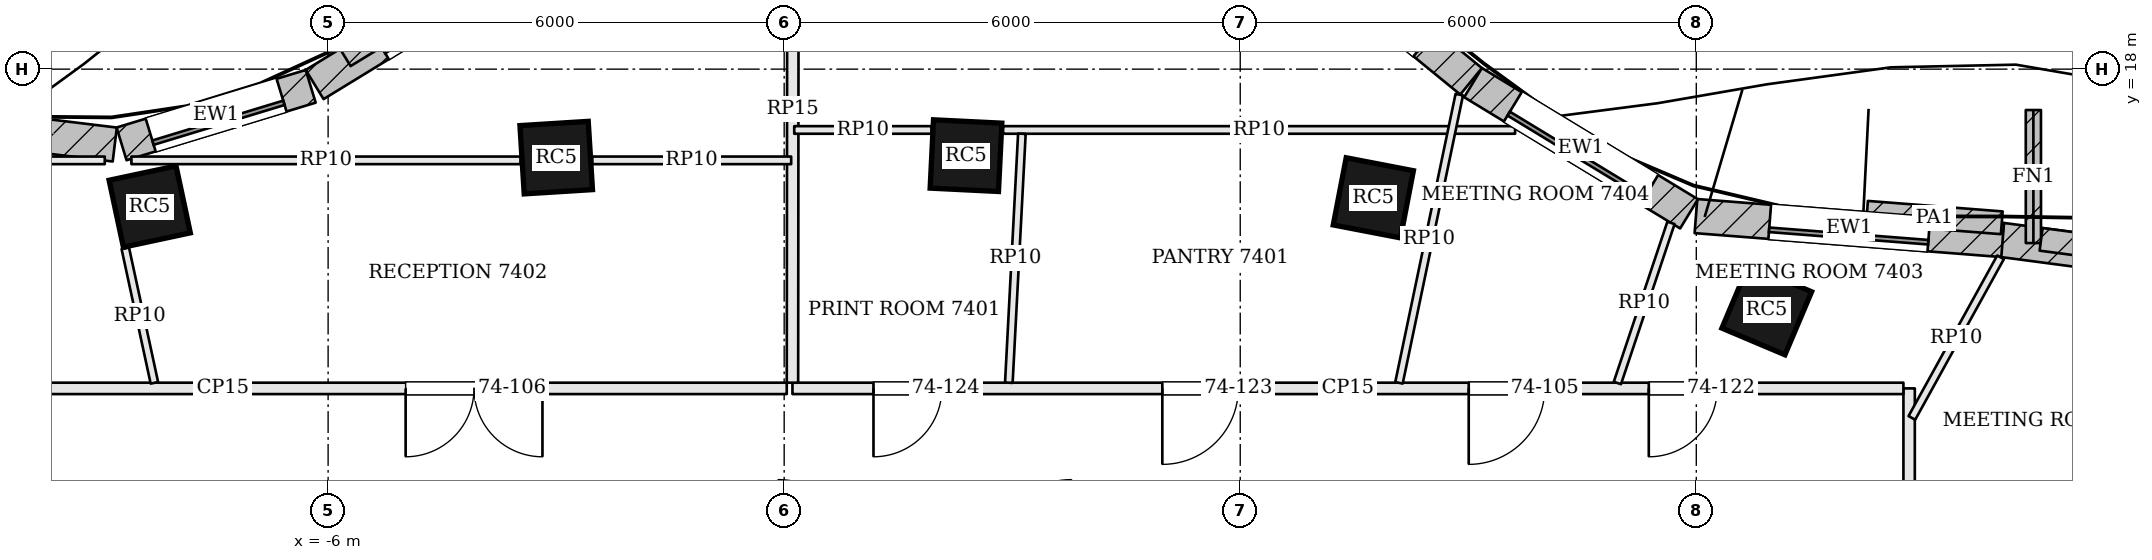
"""IFC4 building model, lengths in metres.
Left out: names, types, materials, properties, quantities, classifications, styles, units other than length and angle.
Written with IfcOpenShell. Run it as: python <this file> out.ifc"""

import sys

from ifc_helpers import new_model, si_unit, direction, frame, frame_2d, origin, origin_2d, place, context, subcontext, project, spatial, rectangle, extrude, element, fill, save


model = new_model("IFC4")
c1 = context("Model", 3, precision=1e-05, world=origin(), true_north=direction((0.0, 1.0)))
c2 = subcontext(c1, "Body", "Model", "MODEL_VIEW")
j1 = project(units=[si_unit("LENGTHUNIT", "METRE"), si_unit("PLANEANGLEUNIT", "RADIAN")], contexts=[c1])
p1 = place(None, origin())
s1 = spatial("IfcSite", under=j1, at=p1, CompositionType="ELEMENT")
p2 = place(p1, origin())
s2 = spatial("IfcBuilding", under=s1, at=p2, CompositionType="ELEMENT")
p3 = place(p2, frame((0.0, 0.0, 300.0)))
s3 = spatial("IfcBuildingStorey", under=s2, at=p3, CompositionType="ELEMENT", Elevation=300.0)
for number, where, z_axis, x_axis in (
    (1, (12.927, 14.832, 0.0), (0.0, 0.0, 1.0), (-0.921, 0.389, 0.0)),
    (2, (7.751, 16.307, 0.0), (0.0, 0.0, 1.0), (-0.982, 0.189, 0.0)),
    (3, (2.392, 16.862, 0.0), (0.0, 0.0, 1.0), (-0.999, 0.049, 0.0)),
    (4, (-2.999, 16.836, 0.0), (0.0, 0.0, 1.0), (-0.998, -0.062, 0.0)),
    (5, (-8.347, 16.192, 0.0), (0.0, 0.0, 1.0), (-0.978, -0.209, 0.0)),
):
    element("IfcColumn", number, at=place(p3, frame(where, z_axis=z_axis, x_axis=x_axis)), inside=s3, PredefinedType="COLUMN", context=c2, shape_type="SweptSolid", body=[
        extrude(rectangle(XDim=0.9, YDim=0.9, at=origin_2d()), origin(), (0.0, 0.0, 1.0), 3.9),
    ])
p4 = place(p3, frame((21.044, 15.091, 0.0), z_axis=(0.0, 0.0, 1.0), x_axis=(-0.991409967396, 0.130790965086, 0.0)))
e6 = element("IfcWall", 6, at=p4, inside=s3, PredefinedType="SOLIDWALL", context=c2, shape_type="SweptSolid", body=[
    extrude(rectangle(XDim=5.068, YDim=0.45, at=frame_2d((2.534, 0.0))), origin(), (0.0, 0.0, 1.0), 3.7),
])
p5 = place(p4, frame((1.484, 0.0, 0.9)))
e7 = element("IfcOpeningElement", 7, at=p5, cuts=e6, PredefinedType="OPENING", context=c2, shape_type="SweptSolid", body=[
    extrude(rectangle(XDim=2.1, YDim=2.3, at=frame_2d((1.05, 1.15))), frame((0.0, 0.235, 0.0), z_axis=(0.0, -1.0, 0.0), x_axis=(1.0, 0.0, 0.0)), (0.0, 0.0, 1.0), 0.47),
])
p6 = place(p3, frame((16.03, 15.752, 0.0), z_axis=(0.0, 0.0, 1.0), x_axis=(-0.996967628157, 0.077817404267, 0.0)))
e8 = element("IfcWall", 8, at=p6, inside=s3, PredefinedType="SOLIDWALL", context=c2, shape_type="SweptSolid", body=[
    extrude(rectangle(XDim=4.047, YDim=0.45, at=frame_2d((2.023, 0.0))), origin(), (0.0, 0.0, 1.0), 3.7),
])
p7 = place(p6, frame((0.974, 0.0, 0.9)))
e9 = element("IfcOpeningElement", 9, at=p7, cuts=e8, PredefinedType="OPENING", context=c2, shape_type="SweptSolid", body=[
    extrude(rectangle(XDim=2.1, YDim=2.3, at=frame_2d((1.05, 1.15))), frame((0.0, 0.235, 0.0), z_axis=(0.0, -1.0, 0.0), x_axis=(1.0, 0.0, 0.0)), (0.0, 0.0, 1.0), 0.47),
])
p8 = place(p3, frame((11.905, 16.096, 0.0), z_axis=(0.0, 0.0, 1.0), x_axis=(-0.854609476155, 0.519271261738, 0.0)))
e10 = element("IfcWall", 10, at=p8, inside=s3, PredefinedType="SOLIDWALL", context=c2, shape_type="SweptSolid", body=[
    extrude(rectangle(XDim=3.325, YDim=0.45, at=frame_2d((1.663, 0.0))), origin(), (0.0, 0.0, 1.0), 3.7),
])
p9 = place(p8, frame((0.612, 0.0, 0.9)))
e11 = element("IfcOpeningElement", 11, at=p9, cuts=e10, PredefinedType="OPENING", context=c2, shape_type="SweptSolid", body=[
    extrude(rectangle(XDim=2.1, YDim=2.3, at=frame_2d((1.05, 1.15))), frame((0.0, 0.235, 0.0), z_axis=(0.0, -1.0, 0.0), x_axis=(1.0, 0.0, 0.0)), (0.0, 0.0, 1.0), 0.47),
])
p10 = place(p3, frame((9.037, 17.84, 0.0), z_axis=(0.0, 0.0, 1.0), x_axis=(-0.774810240287, 0.632193871804, 0.0)))
e12 = element("IfcWall", 12, at=p10, inside=s3, PredefinedType="SOLIDWALL", context=c2, shape_type="SweptSolid", body=[
    extrude(rectangle(XDim=3.389, YDim=0.45, at=frame_2d((1.695, 0.0))), origin(), (0.0, 0.0, 1.0), 3.7),
])
p11 = place(p10, frame((0.795, 0.0, 0.9)))
e13 = element("IfcOpeningElement", 13, at=p11, cuts=e12, PredefinedType="OPENING", context=c2, shape_type="SweptSolid", body=[
    extrude(rectangle(XDim=1.8, YDim=2.3, at=frame_2d((0.9, 1.15))), frame((0.0, 0.235, 0.0), z_axis=(0.0, -1.0, 0.0), x_axis=(1.0, 0.0, 0.0)), (0.0, 0.0, 1.0), 0.47),
])
p12 = place(p3, frame((-2.669, 19.945, 0.0), z_axis=(0.0, 0.0, 1.0), x_axis=(-0.852919259017, -0.522042850346, 0.0)))
e14 = element("IfcWall", 14, at=p12, inside=s3, PredefinedType="SOLIDWALL", context=c2, shape_type="SweptSolid", body=[
    extrude(rectangle(XDim=4.114, YDim=0.45, at=frame_2d((2.057, 0.0))), origin(), (0.0, 0.0, 1.0), 3.7),
])
p13 = place(p12, frame((1.007, 0.0, 0.9)))
e15 = element("IfcOpeningElement", 15, at=p13, cuts=e14, PredefinedType="OPENING", context=c2, shape_type="SweptSolid", body=[
    extrude(rectangle(XDim=2.1, YDim=2.3, at=frame_2d((1.05, 1.15))), frame((0.0, 0.235, 0.0), z_axis=(0.0, -1.0, 0.0), x_axis=(1.0, 0.0, 0.0)), (0.0, 0.0, 1.0), 0.47),
])
p14 = place(p3, frame((-6.229, 17.774, 0.0), z_axis=(0.0, 0.0, 1.0), x_axis=(-0.95663749396, -0.291281144515, 0.0)))
e16 = element("IfcWall", 16, at=p14, inside=s3, PredefinedType="SOLIDWALL", context=c2, shape_type="SweptSolid", body=[
    extrude(rectangle(XDim=2.601, YDim=0.45, at=frame_2d((1.3, 0.0))), origin(), (0.0, 0.0, 1.0), 3.7),
])
p15 = place(p14, frame((0.4, 0.0, 0.9)))
e17 = element("IfcOpeningElement", 17, at=p15, cuts=e16, PredefinedType="OPENING", context=c2, shape_type="SweptSolid", body=[
    extrude(rectangle(XDim=1.8, YDim=2.3, at=frame_2d((0.9, 1.15))), frame((0.0, 0.235, 0.0), z_axis=(0.0, -1.0, 0.0), x_axis=(1.0, 0.0, 0.0)), (0.0, 0.0, 1.0), 0.47),
])
p16 = place(p3, frame((-8.807, 17.008, 0.0), z_axis=(0.0, 0.0, 1.0), x_axis=(-0.992654419289, 0.120984312483, 0.0)))
e18 = element("IfcWall", 18, at=p16, inside=s3, PredefinedType="SOLIDWALL", context=c2, shape_type="SweptSolid", body=[
    extrude(rectangle(XDim=4.187, YDim=0.45, at=frame_2d((2.094, 0.0))), origin(), (0.0, 0.0, 1.0), 3.7),
])
p17 = place(p16, frame((1.044, 0.0, 0.9)))
e19 = element("IfcOpeningElement", 19, at=p17, cuts=e18, PredefinedType="OPENING", context=c2, shape_type="SweptSolid", body=[
    extrude(rectangle(XDim=2.1, YDim=2.3, at=frame_2d((1.05, 1.15))), frame((0.0, 0.235, 0.0), z_axis=(0.0, -1.0, 0.0), x_axis=(1.0, 0.0, 0.0)), (0.0, 0.0, 1.0), 0.47),
])
p18 = place(p3, frame((16.435, 15.712, 0.0), z_axis=(0.0, 0.0, 1.0), x_axis=(-0.000279017846, 0.999999961075, 0.0)))
e20 = element("IfcWall", 20, at=p18, inside=s3, PredefinedType="SOLIDWALL", context=c2, shape_type="SweptSolid", body=[
    extrude(rectangle(XDim=1.75, YDim=0.2, at=frame_2d((0.875, 0.0))), origin(), (0.0, 0.0, 1.0), 3.7),
])
p19 = place(p3, frame((20.923, 15.182, 3.9), z_axis=(0.0, 0.0, 1.0), x_axis=(-0.991411041714, 0.130782821377, 0.0)))
e21 = element("IfcWall", 21, at=p19, inside=s3, PredefinedType="PARAPET", context=c2, shape_type="SweptSolid", body=[
    extrude(rectangle(XDim=4.424, YDim=0.3, at=frame_2d((2.212, 0.0))), origin(), (0.0, 0.0, 1.0), 1.1),
])
p20 = place(p3, frame((16.019, 15.979, 3.9), z_axis=(0.0, 0.0, 1.0), x_axis=(-0.99696580474, 0.077840761676, 0.0)))
e22 = element("IfcWall", 22, at=p20, inside=s3, PredefinedType="PARAPET", context=c2, shape_type="SweptSolid", body=[
    extrude(rectangle(XDim=1.778, YDim=0.3, at=frame_2d((0.889, 0.0))), origin(), (0.0, 0.0, 1.0), 1.1),
])
p21 = place(p3, frame((-3.118, 19.799, 3.9), z_axis=(0.0, 0.0, 1.0), x_axis=(-0.852922319554, -0.522037849975, 0.0)))
e23 = element("IfcWall", 23, at=p21, inside=s3, PredefinedType="PARAPET", context=c2, shape_type="SweptSolid", body=[
    extrude(rectangle(XDim=3.124, YDim=0.3, at=frame_2d((1.562, 0.0))), origin(), (0.0, 0.0, 1.0), 1.1),
])
p22 = place(p3, frame((14.8, -0.069, 0.0), z_axis=(0.0, 0.0, 1.0), x_axis=(0.0, 1.0, 0.0)))
e24 = element("IfcWall", 24, at=p22, inside=s3, PredefinedType="PARTITIONING", context=c2, shape_type="SweptSolid", body=[
    extrude(rectangle(XDim=13.869, YDim=0.15, at=frame_2d((6.935, 0.0))), origin(), (0.0, 0.0, 1.0), 3.198),
])
p23 = place(p22, frame((1.896, 0.0, 0.0)))
e25 = element("IfcOpeningElement", 25, at=p23, cuts=e24, PredefinedType="OPENING", context=c2, shape_type="SweptSolid", body=[
    extrude(rectangle(XDim=1.8, YDim=2.1, at=frame_2d((0.9, 1.05))), frame((0.0, 0.085, 0.0), z_axis=(0.0, -1.0, 0.0), x_axis=(1.0, 0.0, 0.0)), (0.0, 0.0, 1.0), 0.17),
])
p24 = place(p22, frame((6.355, 0.0, 0.0)))
e26 = element("IfcOpeningElement", 26, at=p24, cuts=e24, PredefinedType="OPENING", context=c2, shape_type="SweptSolid", body=[
    extrude(rectangle(XDim=1.0, YDim=2.4, at=frame_2d((0.5, 1.2))), frame((0.0, 0.085, 0.0), z_axis=(0.0, -1.0, 0.0), x_axis=(1.0, 0.0, 0.0)), (0.0, 0.0, 1.0), 0.17),
])
p25 = place(p22, frame((10.267, 0.0, 0.0)))
e27 = element("IfcOpeningElement", 27, at=p25, cuts=e24, PredefinedType="OPENING", context=c2, shape_type="SweptSolid", body=[
    extrude(rectangle(XDim=1.0, YDim=2.4, at=frame_2d((0.5, 1.2))), frame((0.0, 0.085, 0.0), z_axis=(0.0, -1.0, 0.0), x_axis=(1.0, 0.0, 0.0)), (0.0, 0.0, 1.0), 0.17),
])
p26 = place(p3, frame((14.725, 13.8, 0.0), z_axis=(0.0, 0.0, 1.0), x_axis=(-1.0, 0.0, 0.0)))
e28 = element("IfcWall", 28, at=p26, inside=s3, PredefinedType="PARTITIONING", context=c2, shape_type="SweptSolid", body=[
    extrude(rectangle(XDim=14.616, YDim=0.15, at=frame_2d((7.308, 0.0))), origin(), (0.0, 0.0, 1.0), 3.198),
])
p27 = place(p26, frame((4.719, 0.0, 0.0)))
e29 = element("IfcOpeningElement", 29, at=p27, cuts=e28, PredefinedType="OPENING", context=c2, shape_type="SweptSolid", body=[
    extrude(rectangle(XDim=1.0, YDim=2.4, at=frame_2d((0.5, 1.2))), frame((0.0, 0.085, 0.0), z_axis=(0.0, -1.0, 0.0), x_axis=(1.0, 0.0, 0.0)), (0.0, 0.0, 1.0), 0.17),
])
p28 = place(p26, frame((2.45, 0.0, 0.0)))
e30 = element("IfcOpeningElement", 30, at=p28, cuts=e28, PredefinedType="OPENING", context=c2, shape_type="SweptSolid", body=[
    extrude(rectangle(XDim=0.9, YDim=2.1, at=frame_2d((0.45, 1.05))), frame((0.0, 0.085, 0.0), z_axis=(0.0, -1.0, 0.0), x_axis=(1.0, 0.0, 0.0)), (0.0, 0.0, 1.0), 0.17),
])
p29 = place(p26, frame((8.75, 0.0, 0.0)))
e31 = element("IfcOpeningElement", 31, at=p29, cuts=e28, PredefinedType="OPENING", context=c2, shape_type="SweptSolid", body=[
    extrude(rectangle(XDim=1.0, YDim=2.1, at=frame_2d((0.5, 1.05))), frame((0.0, 0.085, 0.0), z_axis=(0.0, -1.0, 0.0), x_axis=(1.0, 0.0, 0.0)), (0.0, 0.0, 1.0), 0.17),
])
p30 = place(p26, frame((12.65, 0.0, 0.0)))
e32 = element("IfcOpeningElement", 32, at=p30, cuts=e28, PredefinedType="OPENING", context=c2, shape_type="SweptSolid", body=[
    extrude(rectangle(XDim=0.9, YDim=2.1, at=frame_2d((0.45, 1.05))), frame((0.0, 0.085, 0.0), z_axis=(0.0, -1.0, 0.0), x_axis=(1.0, 0.0, 0.0)), (0.0, 0.0, 1.0), 0.17),
])
p31 = place(p3, frame((0.117, 21.087, 0.0), z_axis=(0.0, 0.0, 1.0), x_axis=(-0.001083202939, -0.999999413336, 0.0)))
e33 = element("IfcWall", 33, at=p31, inside=s3, PredefinedType="PARTITIONING", context=c2, shape_type="SweptSolid", body=[
    extrude(rectangle(XDim=7.212, YDim=0.15, at=frame_2d((3.606, 0.0))), origin(), (0.0, 0.0, 1.0), 3.234),
])
p32 = place(p3, frame((0.034, 13.8, 0.0), z_axis=(0.0, 0.0, 1.0), x_axis=(-1.0, 0.0, 0.0)))
e34 = element("IfcWall", 34, at=p32, inside=s3, PredefinedType="PARTITIONING", context=c2, shape_type="SweptSolid", body=[
    extrude(rectangle(XDim=14.834, YDim=0.15, at=frame_2d((7.417, 0.0))), origin(), (0.0, 0.0, 1.0), 3.198),
])
p33 = place(p32, frame((3.214, 0.0, 0.0)))
e35 = element("IfcOpeningElement", 35, at=p33, cuts=e34, PredefinedType="OPENING", context=c2, shape_type="SweptSolid", body=[
    extrude(rectangle(XDim=1.8, YDim=2.1, at=frame_2d((0.9, 1.05))), frame((0.0, 0.085, 0.0), z_axis=(0.0, -1.0, 0.0), x_axis=(1.0, 0.0, 0.0)), (0.0, 0.0, 1.0), 0.17),
])
p34 = place(p32, frame((11.55, 0.0, 0.0)))
e36 = element("IfcOpeningElement", 36, at=p34, cuts=e34, PredefinedType="OPENING", context=c2, shape_type="SweptSolid", body=[
    extrude(rectangle(XDim=1.0, YDim=2.4, at=frame_2d((0.5, 1.2))), frame((0.0, 0.085, 0.0), z_axis=(0.0, -1.0, 0.0), x_axis=(1.0, 0.0, 0.0)), (0.0, 0.0, 1.0), 0.17),
])
p35 = place(p3, frame((0.133, 17.2, 0.0), z_axis=(0.0, 0.0, 1.0), x_axis=(1.0, 0.0, 0.0)))
e37 = element("IfcWall", 37, at=p35, inside=s3, PredefinedType="PARTITIONING", context=c2, shape_type="SweptSolid", body=[
    extrude(rectangle(XDim=1.805, YDim=0.1, at=frame_2d((0.903, 0.0))), origin(), (0.0, 0.0, 1.0), 3.184),
])
p36 = place(p3, frame((2.879, 17.2, 0.0), z_axis=(0.0, 0.0, 1.0), x_axis=(1.0, 0.0, 0.0)))
e38 = element("IfcWall", 38, at=p36, inside=s3, PredefinedType="PARTITIONING", context=c2, shape_type="SweptSolid", body=[
    extrude(rectangle(XDim=6.737, YDim=0.1, at=frame_2d((3.369, 0.0))), origin(), (0.0, 0.0, 1.0), 3.184),
])
p37 = place(p3, frame((14.836, 13.412, 0.0), z_axis=(0.0, 0.0, 1.0), x_axis=(0.483304666726, 0.875452225493, 0.0)))
e39 = element("IfcWall", 39, at=p37, inside=s3, PredefinedType="PARTITIONING", context=c2, shape_type="SweptSolid", body=[
    extrude(rectangle(XDim=2.413, YDim=0.1, at=frame_2d((1.207, 0.0))), origin(), (0.0, 0.0, 1.0), 3.184),
])
p38 = place(p3, frame((10.962, 13.871, 0.0), z_axis=(0.0, 0.0, 1.0), x_axis=(0.317447611302, 0.948275811185, 0.0)))
e40 = element("IfcWall", 40, at=p38, inside=s3, PredefinedType="PARTITIONING", context=c2, shape_type="SweptSolid", body=[
    extrude(rectangle(XDim=2.221, YDim=0.1, at=frame_2d((1.111, 0.0))), origin(), (0.0, 0.0, 1.0), 3.184),
])
p39 = place(p3, frame((8.089, 13.873, 0.0), z_axis=(0.0, 0.0, 1.0), x_axis=(0.204762054833, 0.978811780119, 0.0)))
e41 = element("IfcWall", 41, at=p39, inside=s3, PredefinedType="PARTITIONING", context=c2, shape_type="SweptSolid", body=[
    extrude(rectangle(XDim=3.874, YDim=0.1, at=frame_2d((1.937, 0.0))), origin(), (0.0, 0.0, 1.0), 3.184),
])
p40 = place(p3, frame((2.956, 13.875, 0.0), z_axis=(0.0, 0.0, 1.0), x_axis=(0.052332217716, 0.998629730675, 0.0)))
e42 = element("IfcWall", 42, at=p40, inside=s3, PredefinedType="PARTITIONING", context=c2, shape_type="SweptSolid", body=[
    extrude(rectangle(XDim=3.28, YDim=0.1, at=frame_2d((1.64, 0.0))), origin(), (0.0, 0.0, 1.0), 3.184),
])
p41 = place(p3, frame((-18.319, 16.8, 0.0), z_axis=(0.0, 0.0, 1.0), x_axis=(1.0, 0.0, 0.0)))
e43 = element("IfcWall", 43, at=p41, inside=s3, PredefinedType="PARTITIONING", context=c2, shape_type="SweptSolid", body=[
    extrude(rectangle(XDim=9.381, YDim=0.1, at=frame_2d((4.69, 0.0))), origin(), (0.0, 0.0, 1.0), 3.184),
])
p42 = place(p41, frame((4.25, 0.0, 0.0)))
e44 = element("IfcOpeningElement", 44, at=p42, cuts=e43, PredefinedType="OPENING", context=c2, shape_type="SweptSolid", body=[
    extrude(rectangle(XDim=1.0, YDim=2.4, at=frame_2d((0.5, 1.2))), frame((0.0, 0.06, 0.0), z_axis=(0.0, -1.0, 0.0), x_axis=(1.0, 0.0, 0.0)), (0.0, 0.0, 1.0), 0.12),
])
p43 = place(p3, frame((-8.588, 16.8, 0.0), z_axis=(0.0, 0.0, 1.0), x_axis=(1.0, 0.0, 0.0)))
e45 = element("IfcWall", 45, at=p43, inside=s3, PredefinedType="PARTITIONING", context=c2, shape_type="SweptSolid", body=[
    extrude(rectangle(XDim=5.12, YDim=0.1, at=frame_2d((2.56, 0.0))), origin(), (0.0, 0.0, 1.0), 3.184),
])
p44 = place(p3, frame((-2.526, 16.8, 0.0), z_axis=(0.0, 0.0, 1.0), x_axis=(1.0, 0.0, 0.0)))
e46 = element("IfcWall", 46, at=p44, inside=s3, PredefinedType="PARTITIONING", context=c2, shape_type="SweptSolid", body=[
    extrude(rectangle(XDim=2.618, YDim=0.1, at=frame_2d((1.309, 0.0))), origin(), (0.0, 0.0, 1.0), 3.184),
])
p45 = place(p3, frame((-8.286, 13.873, 0.0), z_axis=(0.0, 0.0, 1.0), x_axis=(-0.21131538294, 0.977417929513, 0.0)))
e47 = element("IfcWall", 47, at=p45, inside=s3, PredefinedType="PARTITIONING", context=c2, shape_type="SweptSolid", body=[
    extrude(rectangle(XDim=1.81, YDim=0.1, at=frame_2d((0.905, 0.0))), origin(), (0.0, 0.0, 1.0), 3.184),
])
p46 = place(p7, origin())
e48 = element("IfcWindow", 48, at=p46, inside=s3, PartitioningType="SINGLE_PANEL", PredefinedType="WINDOW", context=c2, shape_type="SweptSolid", body=[
    extrude(rectangle(XDim=2.1, YDim=2.3, at=frame_2d((1.05, 1.15))), frame((0.0, 0.135, 0.0), z_axis=(0.0, -1.0, 0.0), x_axis=(1.0, 0.0, 0.0)), (0.0, 0.0, 1.0), 0.06),
])
fill(e9, e48)
p47 = place(p9, origin())
e49 = element("IfcWindow", 49, at=p47, inside=s3, PartitioningType="SINGLE_PANEL", PredefinedType="WINDOW", context=c2, shape_type="SweptSolid", body=[
    extrude(rectangle(XDim=2.1, YDim=2.3, at=frame_2d((1.05, 1.15))), frame((0.0, 0.135, 0.0), z_axis=(0.0, -1.0, 0.0), x_axis=(1.0, 0.0, 0.0)), (0.0, 0.0, 1.0), 0.06),
])
fill(e11, e49)
p48 = place(p13, origin())
e50 = element("IfcWindow", 50, at=p48, inside=s3, PartitioningType="SINGLE_PANEL", PredefinedType="WINDOW", context=c2, shape_type="SweptSolid", body=[
    extrude(rectangle(XDim=2.1, YDim=2.3, at=frame_2d((1.05, 1.15))), frame((0.0, 0.135, 0.0), z_axis=(0.0, -1.0, 0.0), x_axis=(1.0, 0.0, 0.0)), (0.0, 0.0, 1.0), 0.06),
])
fill(e15, e50)
p49 = place(p15, origin())
e51 = element("IfcWindow", 51, at=p49, inside=s3, PartitioningType="SINGLE_PANEL", PredefinedType="WINDOW", context=c2, shape_type="SweptSolid", body=[
    extrude(rectangle(XDim=1.8, YDim=2.3, at=frame_2d((0.9, 1.15))), frame((0.0, 0.135, 0.0), z_axis=(0.0, -1.0, 0.0), x_axis=(1.0, 0.0, 0.0)), (0.0, 0.0, 1.0), 0.06),
])
fill(e17, e51)
p50 = place(p27, origin())
e52 = element("IfcDoor", 52, at=p50, inside=s3, OperationType="SINGLE_SWING_RIGHT", PredefinedType="DOOR", context=c2, shape_type="SweptSolid", body=[
    extrude(rectangle(XDim=1.0, YDim=2.4, at=frame_2d((0.5, 1.2))), frame((0.0, 0.025, 0.0), z_axis=(0.0, -1.0, 0.0), x_axis=(1.0, 0.0, 0.0)), (0.0, 0.0, 1.0), 0.05),
])
fill(e29, e52)
p51 = place(p33, origin())
e53 = element("IfcDoor", 53, at=p51, inside=s3, OperationType="DOUBLE_DOOR_SINGLE_SWING", PredefinedType="DOOR", context=c2, shape_type="SweptSolid", body=[
    extrude(rectangle(XDim=1.8, YDim=2.1, at=frame_2d((0.9, 1.05))), frame((0.0, 0.025, 0.0), z_axis=(0.0, -1.0, 0.0), x_axis=(1.0, 0.0, 0.0)), (0.0, 0.0, 1.0), 0.05),
])
fill(e35, e53)
p52 = place(p28, origin())
e54 = element("IfcDoor", 54, at=p52, inside=s3, OperationType="SINGLE_SWING_RIGHT", PredefinedType="DOOR", context=c2, shape_type="SweptSolid", body=[
    extrude(rectangle(XDim=0.9, YDim=2.1, at=frame_2d((0.45, 1.05))), frame((0.0, 0.025, 0.0), z_axis=(0.0, -1.0, 0.0), x_axis=(1.0, 0.0, 0.0)), (0.0, 0.0, 1.0), 0.05),
])
fill(e30, e54)
p53 = place(p29, origin())
e55 = element("IfcDoor", 55, at=p53, inside=s3, OperationType="SINGLE_SWING_RIGHT", PredefinedType="DOOR", context=c2, shape_type="SweptSolid", body=[
    extrude(rectangle(XDim=1.0, YDim=2.1, at=frame_2d((0.5, 1.05))), frame((0.0, 0.025, 0.0), z_axis=(0.0, -1.0, 0.0), x_axis=(1.0, 0.0, 0.0)), (0.0, 0.0, 1.0), 0.05),
])
fill(e31, e55)
p54 = place(p30, origin())
e56 = element("IfcDoor", 56, at=p54, inside=s3, OperationType="SINGLE_SWING_RIGHT", PredefinedType="DOOR", context=c2, shape_type="SweptSolid", body=[
    extrude(rectangle(XDim=0.9, YDim=2.1, at=frame_2d((0.45, 1.05))), frame((0.0, 0.025, 0.0), z_axis=(0.0, -1.0, 0.0), x_axis=(1.0, 0.0, 0.0)), (0.0, 0.0, 1.0), 0.05),
])
fill(e32, e56)
save(model, sys.argv[1])
